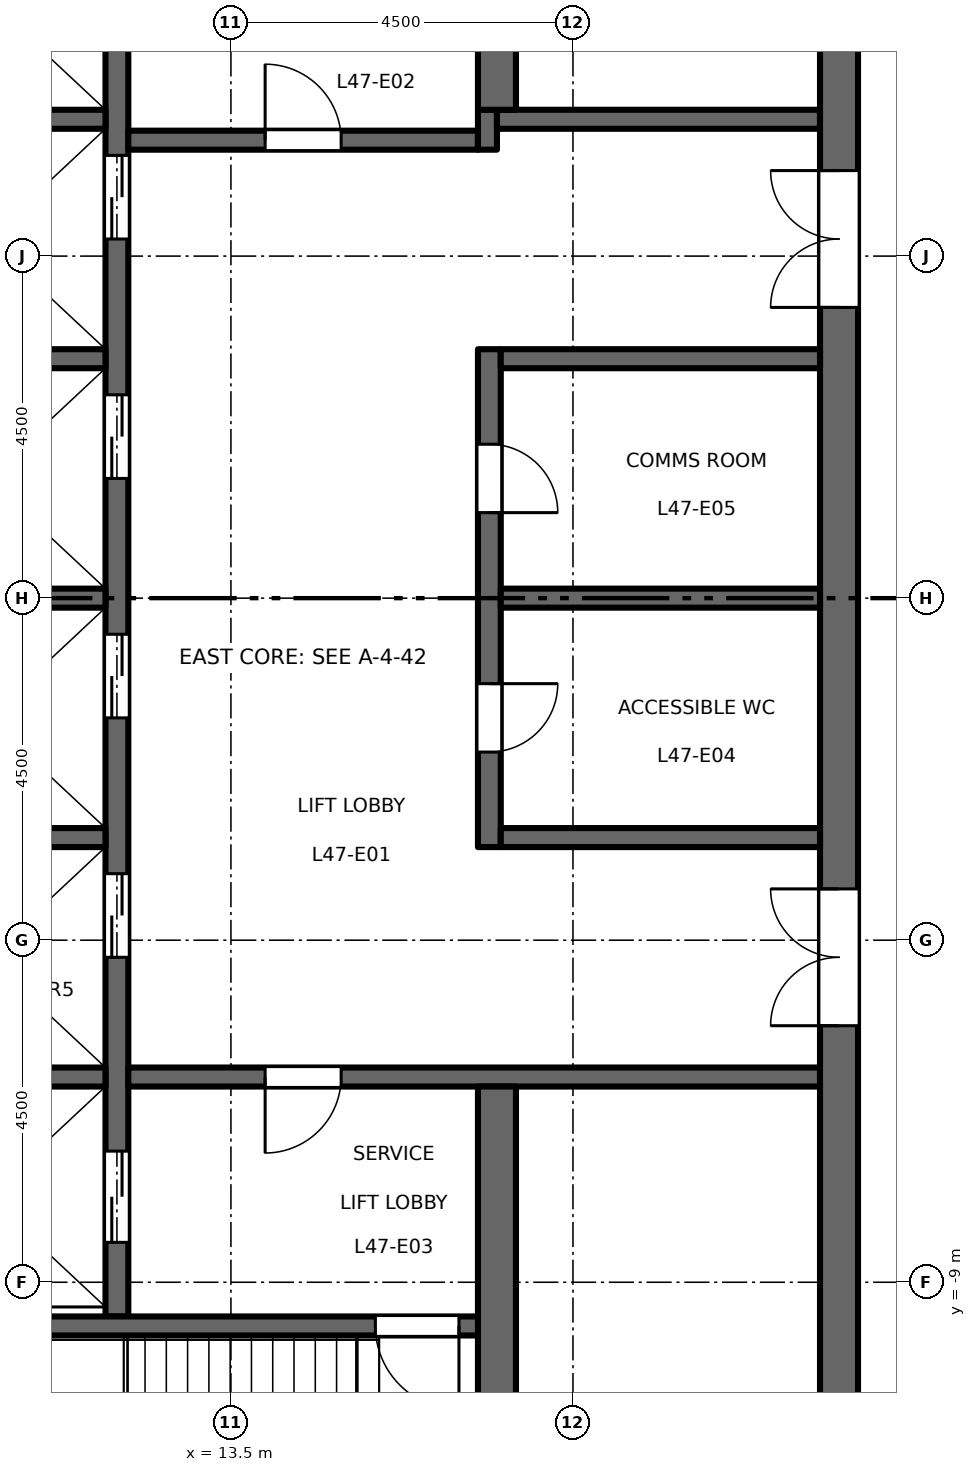
"""IFC4 building model, lengths in metres.
Left out: names, types, materials, properties, quantities, classifications, styles, units other than length and angle.
Written with IfcOpenShell. Run it as: python <this file> out.ifc"""

import sys

from ifc_helpers import new_model, si_unit, direction, frame, frame_2d, origin, place, context, subcontext, project, spatial, rectangle, extrude, element, fill, save


model = new_model("IFC4")
c1 = context("Model", 3, precision=1e-05, world=origin(), true_north=direction((0.0, 1.0)))
c2 = subcontext(c1, "Body", "Model", "MODEL_VIEW")
j1 = project(units=[si_unit("LENGTHUNIT", "METRE"), si_unit("PLANEANGLEUNIT", "RADIAN")], contexts=[c1])
p1 = place(None, origin())
s1 = spatial("IfcSite", under=j1, at=p1, CompositionType="ELEMENT")
p2 = place(p1, origin())
s2 = spatial("IfcBuilding", under=s1, at=p2, CompositionType="ELEMENT")
p3 = place(p2, frame((0.0, 0.0, 219.7)))
s3 = spatial("IfcBuildingStorey", under=s2, at=p3, CompositionType="ELEMENT", Elevation=219.7)
p4 = place(p3, frame((12.0, -9.45, 0.0), z_axis=(0.0, 0.0, 1.0), x_axis=(0.0, 1.0, 0.0)))
e1 = element("IfcWall", 1, at=p4, inside=s3, PredefinedType="SHEAR", context=c2, shape_type="SweptSolid", body=[
    extrude(rectangle(XDim=18.9, YDim=0.3, at=frame_2d((9.45, 0.0))), origin(), (0.0, 0.0, 1.0), 4.35),
])
p5 = place(p4, frame((4.725, 0.0, 0.0)))
e2 = element("IfcOpeningElement", 2, at=p5, cuts=e1, PredefinedType="OPENING", context=c2, shape_type="SweptSolid", body=[
    extrude(rectangle(XDim=1.1, YDim=2.1, at=frame_2d((0.55, 1.05))), frame((0.0, 0.16, 0.0), z_axis=(0.0, -1.0, 0.0), x_axis=(1.0, 0.0, 0.0)), (0.0, 0.0, 1.0), 0.32),
])
p6 = place(p4, frame((7.875, 0.0, 0.0)))
e3 = element("IfcOpeningElement", 3, at=p6, cuts=e1, PredefinedType="OPENING", context=c2, shape_type="SweptSolid", body=[
    extrude(rectangle(XDim=1.1, YDim=2.1, at=frame_2d((0.55, 1.05))), frame((0.0, 0.16, 0.0), z_axis=(0.0, -1.0, 0.0), x_axis=(1.0, 0.0, 0.0)), (0.0, 0.0, 1.0), 0.32),
])
p7 = place(p4, frame((11.025, 0.0, 0.0)))
e4 = element("IfcOpeningElement", 4, at=p7, cuts=e1, PredefinedType="OPENING", context=c2, shape_type="SweptSolid", body=[
    extrude(rectangle(XDim=1.1, YDim=2.1, at=frame_2d((0.55, 1.05))), frame((0.0, 0.16, 0.0), z_axis=(0.0, -1.0, 0.0), x_axis=(1.0, 0.0, 0.0)), (0.0, 0.0, 1.0), 0.32),
])
p8 = place(p4, frame((14.175, 0.0, 0.0)))
e5 = element("IfcOpeningElement", 5, at=p8, cuts=e1, PredefinedType="OPENING", context=c2, shape_type="SweptSolid", body=[
    extrude(rectangle(XDim=1.1, YDim=2.1, at=frame_2d((0.55, 1.05))), frame((0.0, 0.16, 0.0), z_axis=(0.0, -1.0, 0.0), x_axis=(1.0, 0.0, 0.0)), (0.0, 0.0, 1.0), 0.32),
])
p9 = place(p4, frame((16.725, 0.0, 0.0)))
e6 = element("IfcOpeningElement", 6, at=p9, cuts=e1, PredefinedType="OPENING", context=c2, shape_type="SweptSolid", body=[
    extrude(rectangle(XDim=1.2, YDim=2.1, at=frame_2d((0.6, 1.05))), frame((0.0, 0.16, 0.0), z_axis=(0.0, -1.0, 0.0), x_axis=(1.0, 0.0, 0.0)), (0.0, 0.0, 1.0), 0.32),
])
p10 = place(p4, frame((0.975, 0.0, 0.0)))
e7 = element("IfcOpeningElement", 7, at=p10, cuts=e1, PredefinedType="OPENING", context=c2, shape_type="SweptSolid", body=[
    extrude(rectangle(XDim=1.2, YDim=2.1, at=frame_2d((0.6, 1.05))), frame((0.0, 0.16, 0.0), z_axis=(0.0, -1.0, 0.0), x_axis=(1.0, 0.0, 0.0)), (0.0, 0.0, 1.0), 0.32),
])
p11 = place(p3, frame((12.15, 6.025, 0.0), z_axis=(0.0, 0.0, 1.0), x_axis=(1.0, 0.0, 0.0)))
e8 = element("IfcWall", 8, at=p11, inside=s3, PredefinedType="SHEAR", context=c2, shape_type="SweptSolid", body=[
    extrude(rectangle(XDim=4.6, YDim=0.25, at=frame_2d((2.3, 0.0))), origin(), (0.0, 0.0, 1.0), 4.35),
])
p12 = place(p11, frame((1.8, 0.0, 0.0)))
e9 = element("IfcOpeningElement", 9, at=p12, cuts=e8, PredefinedType="OPENING", context=c2, shape_type="SweptSolid", body=[
    extrude(rectangle(XDim=1.0, YDim=2.1, at=frame_2d((0.5, 1.05))), frame((0.0, 0.135, 0.0), z_axis=(0.0, -1.0, 0.0), x_axis=(1.0, 0.0, 0.0)), (0.0, 0.0, 1.0), 0.27),
])
p13 = place(p3, frame((16.875, 5.9, 0.0), z_axis=(0.0, 0.0, 1.0), x_axis=(0.0, 1.0, 0.0)))
e10 = element("IfcWall", 10, at=p13, inside=s3, PredefinedType="SHEAR", context=c2, shape_type="SweptSolid", body=[
    extrude(rectangle(XDim=0.525, YDim=0.25, at=frame_2d((0.263, 0.0))), origin(), (0.0, 0.0, 1.0), 4.35),
])
p14 = place(p3, frame((17.0, 6.3, 0.0), z_axis=(0.0, 0.0, 1.0), x_axis=(1.0, 0.0, 0.0)))
e11 = element("IfcWall", 11, at=p14, inside=s3, PredefinedType="SHEAR", context=c2, shape_type="SweptSolid", body=[
    extrude(rectangle(XDim=4.25, YDim=0.25, at=frame_2d((2.125, 0.0))), origin(), (0.0, 0.0, 1.0), 4.35),
])
p15 = place(p3, frame((12.15, -6.3, 0.0), z_axis=(0.0, 0.0, 1.0), x_axis=(1.0, 0.0, 0.0)))
e12 = element("IfcWall", 12, at=p15, inside=s3, PredefinedType="SHEAR", context=c2, shape_type="SweptSolid", body=[
    extrude(rectangle(XDim=9.1, YDim=0.25, at=frame_2d((4.55, 0.0))), origin(), (0.0, 0.0, 1.0), 4.35),
])
p16 = place(p15, frame((1.8, 0.0, 0.0)))
e13 = element("IfcOpeningElement", 13, at=p16, cuts=e12, PredefinedType="OPENING", context=c2, shape_type="SweptSolid", body=[
    extrude(rectangle(XDim=1.0, YDim=2.1, at=frame_2d((0.5, 1.05))), frame((0.0, 0.135, 0.0), z_axis=(0.0, -1.0, 0.0), x_axis=(1.0, 0.0, 0.0)), (0.0, 0.0, 1.0), 0.27),
])
p17 = place(p3, frame((21.5, -13.0, 0.0), z_axis=(0.0, 0.0, 1.0), x_axis=(0.0, 1.0, 0.0)))
e14 = element("IfcWall", 14, at=p17, inside=s3, PredefinedType="SHEAR", context=c2, shape_type="SweptSolid", body=[
    extrude(rectangle(XDim=26.0, YDim=0.5, at=frame_2d((13.0, 0.0))), origin(), (0.0, 0.0, 1.0), 4.35),
])
p18 = place(p17, frame((16.825, 0.0, 0.0)))
e15 = element("IfcOpeningElement", 15, at=p18, cuts=e14, PredefinedType="OPENING", context=c2, shape_type="SweptSolid", body=[
    extrude(rectangle(XDim=1.8, YDim=2.1, at=frame_2d((0.9, 1.05))), frame((0.0, 0.26, 0.0), z_axis=(0.0, -1.0, 0.0), x_axis=(1.0, 0.0, 0.0)), (0.0, 0.0, 1.0), 0.52),
])
p19 = place(p17, frame((7.375, 0.0, 0.0)))
e16 = element("IfcOpeningElement", 16, at=p19, cuts=e14, PredefinedType="OPENING", context=c2, shape_type="SweptSolid", body=[
    extrude(rectangle(XDim=1.8, YDim=2.1, at=frame_2d((0.9, 1.05))), frame((0.0, 0.26, 0.0), z_axis=(0.0, -1.0, 0.0), x_axis=(1.0, 0.0, 0.0)), (0.0, 0.0, 1.0), 0.52),
])
p20 = place(p3, frame((16.9, -3.275, 0.0), z_axis=(0.0, 0.0, 1.0), x_axis=(0.0, 1.0, 0.0)))
e17 = element("IfcWall", 17, at=p20, inside=s3, PredefinedType="SHEAR", context=c2, shape_type="SweptSolid", body=[
    extrude(rectangle(XDim=6.55, YDim=0.3, at=frame_2d((3.275, 0.0))), origin(), (0.0, 0.0, 1.0), 4.35),
])
p21 = place(p20, frame((1.25, 0.0, 0.0)))
e18 = element("IfcOpeningElement", 18, at=p21, cuts=e17, PredefinedType="OPENING", context=c2, shape_type="SweptSolid", body=[
    extrude(rectangle(XDim=0.9, YDim=2.1, at=frame_2d((0.45, 1.05))), frame((0.0, 0.16, 0.0), z_axis=(0.0, -1.0, 0.0), x_axis=(1.0, 0.0, 0.0)), (0.0, 0.0, 1.0), 0.32),
])
p22 = place(p20, frame((4.4, 0.0, 0.0)))
e19 = element("IfcOpeningElement", 19, at=p22, cuts=e17, PredefinedType="OPENING", context=c2, shape_type="SweptSolid", body=[
    extrude(rectangle(XDim=0.9, YDim=2.1, at=frame_2d((0.45, 1.05))), frame((0.0, 0.16, 0.0), z_axis=(0.0, -1.0, 0.0), x_axis=(1.0, 0.0, 0.0)), (0.0, 0.0, 1.0), 0.32),
])
for number, where, z_axis, x_axis in (
    (20, (17.05, 0.0, 0.0), (0.0, 0.0, 1.0), (1.0, 0.0, 0.0)),
    (21, (17.05, 3.15, 0.0), (0.0, 0.0, 1.0), (1.0, 0.0, 0.0)),
    (22, (17.05, -3.15, 0.0), (0.0, 0.0, 1.0), (1.0, 0.0, 0.0)),
):
    element("IfcWall", number, at=place(p3, frame(where, z_axis=z_axis, x_axis=x_axis)), inside=s3, PredefinedType="SHEAR", context=c2, shape_type="SweptSolid", body=[
        extrude(rectangle(XDim=4.2, YDim=0.25, at=frame_2d((2.1, 0.0))), origin(), (0.0, 0.0, 1.0), 4.35),
    ])
for number, where, z_axis, x_axis in (
    (23, (17.0, 6.425, 0.0), (0.0, 0.0, 1.0), (0.0, 1.0, 0.0)),
    (24, (17.0, -13.0, 0.0), (0.0, 0.0, 1.0), (0.0, 1.0, 0.0)),
):
    element("IfcWall", number, at=place(p3, frame(where, z_axis=z_axis, x_axis=x_axis)), inside=s3, PredefinedType="SHEAR", context=c2, shape_type="SweptSolid", body=[
        extrude(rectangle(XDim=6.575, YDim=0.5, at=frame_2d((3.288, 0.0))), origin(), (0.0, 0.0, 1.0), 4.35),
    ])
for number, where, z_axis, x_axis in (
    (25, (8.75, 0.0, 0.0), (0.0, 0.0, 1.0), (1.0, 0.0, 0.0)),
    (26, (8.75, 3.15, 0.0), (0.0, 0.0, 1.0), (1.0, 0.0, 0.0)),
    (27, (8.75, 6.3, 0.0), (0.0, 0.0, 1.0), (1.0, 0.0, 0.0)),
    (28, (8.75, -3.15, 0.0), (0.0, 0.0, 1.0), (1.0, 0.0, 0.0)),
    (29, (8.75, -6.3, 0.0), (0.0, 0.0, 1.0), (1.0, 0.0, 0.0)),
):
    element("IfcWall", number, at=place(p3, frame(where, z_axis=z_axis, x_axis=x_axis)), inside=s3, PredefinedType="SHEAR", context=c2, shape_type="SweptSolid", body=[
        extrude(rectangle(XDim=3.1, YDim=0.25, at=frame_2d((1.55, 0.0))), origin(), (0.0, 0.0, 1.0), 4.35),
    ])
p23 = place(p3, frame((8.75, -9.575, 0.0), z_axis=(0.0, 0.0, 1.0), x_axis=(1.0, 0.0, 0.0)))
e30 = element("IfcWall", 30, at=p23, inside=s3, PredefinedType="SHEAR", context=c2, shape_type="SweptSolid", body=[
    extrude(rectangle(XDim=8.0, YDim=0.25, at=frame_2d((4.0, 0.0))), origin(), (0.0, 0.0, 1.0), 4.35),
])
p24 = place(p23, frame((6.65, 0.0, 0.0)))
e31 = element("IfcOpeningElement", 31, at=p24, cuts=e30, PredefinedType="OPENING", context=c2, shape_type="SweptSolid", body=[
    extrude(rectangle(XDim=1.1, YDim=2.1, at=frame_2d((0.55, 1.05))), frame((0.0, 0.135, 0.0), z_axis=(0.0, -1.0, 0.0), x_axis=(1.0, 0.0, 0.0)), (0.0, 0.0, 1.0), 0.27),
])
p25 = place(p12, origin())
e32 = element("IfcDoor", 32, at=p25, inside=s3, OperationType="SINGLE_SWING_RIGHT", PredefinedType="DOOR", context=c2, shape_type="SweptSolid", body=[
    extrude(rectangle(XDim=1.0, YDim=2.1, at=frame_2d((0.5, 1.05))), frame((0.0, 0.025, 0.0), z_axis=(0.0, -1.0, 0.0), x_axis=(1.0, 0.0, 0.0)), (0.0, 0.0, 1.0), 0.05),
])
fill(e9, e32)
p26 = place(p16, origin())
e33 = element("IfcDoor", 33, at=p26, inside=s3, OperationType="SINGLE_SWING_LEFT", PredefinedType="DOOR", context=c2, shape_type="SweptSolid", body=[
    extrude(rectangle(XDim=1.0, YDim=2.1, at=frame_2d((0.5, 1.05))), frame((0.0, 0.025, 0.0), z_axis=(0.0, -1.0, 0.0), x_axis=(1.0, 0.0, 0.0)), (0.0, 0.0, 1.0), 0.05),
])
fill(e13, e33)
p27 = place(p24, origin())
e34 = element("IfcDoor", 34, at=p27, inside=s3, OperationType="SINGLE_SWING_RIGHT", PredefinedType="DOOR", context=c2, shape_type="SweptSolid", body=[
    extrude(rectangle(XDim=1.1, YDim=2.1, at=frame_2d((0.55, 1.05))), frame((0.0, 0.025, 0.0), z_axis=(0.0, -1.0, 0.0), x_axis=(1.0, 0.0, 0.0)), (0.0, 0.0, 1.0), 0.05),
])
fill(e31, e34)
p28 = place(p18, origin())
e35 = element("IfcDoor", 35, at=p28, inside=s3, OperationType="DOUBLE_DOOR_DOUBLE_SWING", PredefinedType="DOOR", context=c2, shape_type="SweptSolid", body=[
    extrude(rectangle(XDim=1.8, YDim=2.1, at=frame_2d((0.9, 1.05))), frame((0.0, 0.025, 0.0), z_axis=(0.0, -1.0, 0.0), x_axis=(1.0, 0.0, 0.0)), (0.0, 0.0, 1.0), 0.05),
])
fill(e15, e35)
p29 = place(p19, origin())
e36 = element("IfcDoor", 36, at=p29, inside=s3, OperationType="DOUBLE_DOOR_DOUBLE_SWING", PredefinedType="DOOR", context=c2, shape_type="SweptSolid", body=[
    extrude(rectangle(XDim=1.8, YDim=2.1, at=frame_2d((0.9, 1.05))), frame((0.0, 0.025, 0.0), z_axis=(0.0, -1.0, 0.0), x_axis=(1.0, 0.0, 0.0)), (0.0, 0.0, 1.0), 0.05),
])
fill(e16, e36)
p30 = place(p5, origin())
e37 = element("IfcDoor", 37, at=p30, inside=s3, OperationType="DOUBLE_DOOR_SLIDING", PredefinedType="DOOR", context=c2, shape_type="SweptSolid", body=[
    extrude(rectangle(XDim=1.1, YDim=2.1, at=frame_2d((0.55, 1.05))), frame((0.0, 0.025, 0.0), z_axis=(0.0, -1.0, 0.0), x_axis=(1.0, 0.0, 0.0)), (0.0, 0.0, 1.0), 0.05),
])
fill(e2, e37)
p31 = place(p6, origin())
e38 = element("IfcDoor", 38, at=p31, inside=s3, OperationType="DOUBLE_DOOR_SLIDING", PredefinedType="DOOR", context=c2, shape_type="SweptSolid", body=[
    extrude(rectangle(XDim=1.1, YDim=2.1, at=frame_2d((0.55, 1.05))), frame((0.0, 0.025, 0.0), z_axis=(0.0, -1.0, 0.0), x_axis=(1.0, 0.0, 0.0)), (0.0, 0.0, 1.0), 0.05),
])
fill(e3, e38)
p32 = place(p7, origin())
e39 = element("IfcDoor", 39, at=p32, inside=s3, OperationType="DOUBLE_DOOR_SLIDING", PredefinedType="DOOR", context=c2, shape_type="SweptSolid", body=[
    extrude(rectangle(XDim=1.1, YDim=2.1, at=frame_2d((0.55, 1.05))), frame((0.0, 0.025, 0.0), z_axis=(0.0, -1.0, 0.0), x_axis=(1.0, 0.0, 0.0)), (0.0, 0.0, 1.0), 0.05),
])
fill(e4, e39)
p33 = place(p8, origin())
e40 = element("IfcDoor", 40, at=p33, inside=s3, OperationType="DOUBLE_DOOR_SLIDING", PredefinedType="DOOR", context=c2, shape_type="SweptSolid", body=[
    extrude(rectangle(XDim=1.1, YDim=2.1, at=frame_2d((0.55, 1.05))), frame((0.0, 0.025, 0.0), z_axis=(0.0, -1.0, 0.0), x_axis=(1.0, 0.0, 0.0)), (0.0, 0.0, 1.0), 0.05),
])
fill(e5, e40)
p34 = place(p10, origin())
e41 = element("IfcDoor", 41, at=p34, inside=s3, OperationType="DOUBLE_DOOR_SLIDING", PredefinedType="DOOR", context=c2, shape_type="SweptSolid", body=[
    extrude(rectangle(XDim=1.2, YDim=2.1, at=frame_2d((0.6, 1.05))), frame((0.0, 0.025, 0.0), z_axis=(0.0, -1.0, 0.0), x_axis=(1.0, 0.0, 0.0)), (0.0, 0.0, 1.0), 0.05),
])
fill(e7, e41)
p35 = place(p21, origin())
e42 = element("IfcDoor", 42, at=p35, inside=s3, OperationType="SINGLE_SWING_RIGHT", PredefinedType="DOOR", context=c2, shape_type="SweptSolid", body=[
    extrude(rectangle(XDim=0.9, YDim=2.1, at=frame_2d((0.45, 1.05))), frame((0.0, 0.025, 0.0), z_axis=(0.0, -1.0, 0.0), x_axis=(1.0, 0.0, 0.0)), (0.0, 0.0, 1.0), 0.05),
])
fill(e18, e42)
p36 = place(p22, origin())
e43 = element("IfcDoor", 43, at=p36, inside=s3, OperationType="SINGLE_SWING_LEFT", PredefinedType="DOOR", context=c2, shape_type="SweptSolid", body=[
    extrude(rectangle(XDim=0.9, YDim=2.1, at=frame_2d((0.45, 1.05))), frame((0.0, 0.025, 0.0), z_axis=(0.0, -1.0, 0.0), x_axis=(1.0, 0.0, 0.0)), (0.0, 0.0, 1.0), 0.05),
])
fill(e19, e43)
save(model, sys.argv[1])
